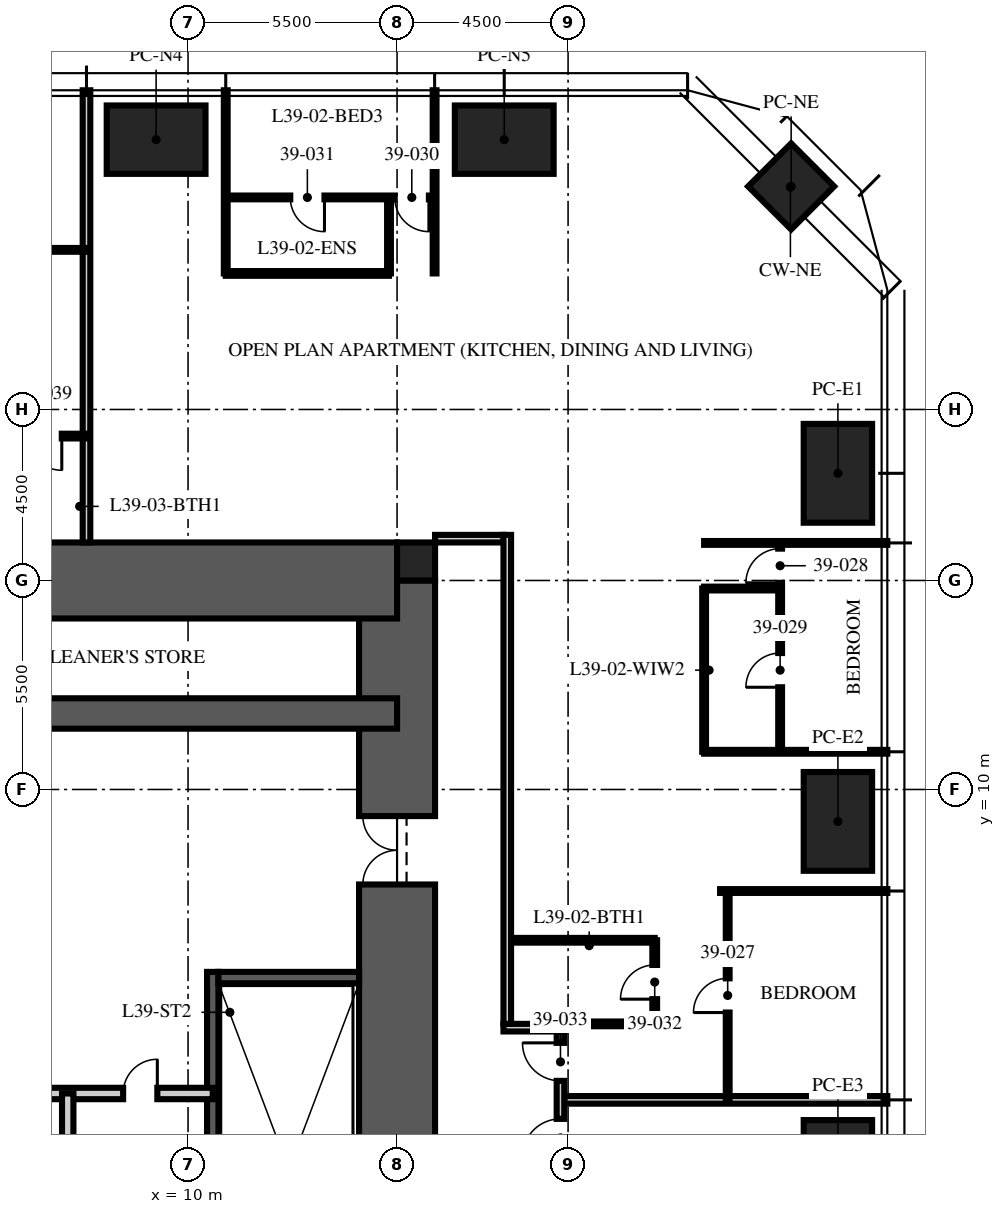
"""IFC4 building model, lengths in metres.
Left out: names, types, materials, properties, quantities, classifications, styles, units other than length and angle.
Written with IfcOpenShell. Run it as: python <this file> out.ifc"""

import sys

from ifc_helpers import new_model, si_unit, direction, frame, frame_2d, origin, origin_2d, place, context, subcontext, project, spatial, rectangle, extrude, element, fill, save


model = new_model("IFC4")
c1 = context("Model", 3, precision=1e-05, world=origin(), true_north=direction((0.0, 1.0)))
c2 = subcontext(c1, "Body", "Model", "MODEL_VIEW")
j1 = project(units=[si_unit("LENGTHUNIT", "METRE"), si_unit("PLANEANGLEUNIT", "RADIAN")], contexts=[c1])
p1 = place(None, origin())
s1 = spatial("IfcSite", under=j1, at=p1, CompositionType="ELEMENT")
p2 = place(p1, origin())
s2 = spatial("IfcBuilding", under=s1, at=p2, CompositionType="ELEMENT")
p3 = place(p2, frame((0.0, 0.0, 156.0)))
s3 = spatial("IfcBuildingStorey", under=s2, at=p3, CompositionType="ELEMENT", Elevation=156.0)
p4 = place(p3, frame((15.5, -15.5, -0.25), z_axis=(0.0, 0.0, 1.0), x_axis=(0.0, 1.0, 0.0)))
e1 = element("IfcWall", 1, at=p4, inside=s3, PredefinedType="SHEAR", context=c2, shape_type="SweptSolid", body=[
    extrude(rectangle(XDim=31.0, YDim=2.0, at=frame_2d((15.5, 0.0))), origin(), (0.0, 0.0, 1.0), 3.75),
])
p5 = place(p4, frame((6.5, 0.0, 0.25)))
e2 = element("IfcOpeningElement", 2, at=p5, cuts=e1, PredefinedType="OPENING", context=c2, shape_type="SweptSolid", body=[
    extrude(rectangle(XDim=1.2, YDim=2.1, at=frame_2d((0.6, 1.05))), frame((0.0, 1.01, 0.0), z_axis=(0.0, -1.0, 0.0), x_axis=(1.0, 0.0, 0.0)), (0.0, 0.0, 1.0), 2.02),
])
p6 = place(p4, frame((23.0, 0.0, 0.25)))
e3 = element("IfcOpeningElement", 3, at=p6, cuts=e1, PredefinedType="OPENING", context=c2, shape_type="SweptSolid", body=[
    extrude(rectangle(XDim=1.8, YDim=2.1, at=frame_2d((0.9, 1.05))), frame((0.0, 1.01, 0.0), z_axis=(0.0, -1.0, 0.0), x_axis=(1.0, 0.0, 0.0)), (0.0, 0.0, 1.0), 2.02),
])
p7 = place(p3, frame((-15.5, 15.5, -0.25), z_axis=(0.0, 0.0, 1.0), x_axis=(1.0, 0.0, 0.0)))
e4 = element("IfcWall", 4, at=p7, inside=s3, PredefinedType="SHEAR", context=c2, shape_type="SweptSolid", body=[
    extrude(rectangle(XDim=31.0, YDim=2.0, at=frame_2d((15.5, 0.0))), origin(), (0.0, 0.0, 1.0), 3.75),
])
p8 = place(p7, frame((5.0, 0.0, 0.25)))
e5 = element("IfcOpeningElement", 5, at=p8, cuts=e4, PredefinedType="OPENING", context=c2, shape_type="SweptSolid", body=[
    extrude(rectangle(XDim=1.0, YDim=2.1, at=frame_2d((0.5, 1.05))), frame((0.0, 1.01, 0.0), z_axis=(0.0, -1.0, 0.0), x_axis=(1.0, 0.0, 0.0)), (0.0, 0.0, 1.0), 2.02),
])
p9 = place(p3, frame((-15.5, 12.0, -0.25), z_axis=(0.0, 0.0, 1.0), x_axis=(1.0, 0.0, 0.0)))
e6 = element("IfcWall", 6, at=p9, inside=s3, PredefinedType="SHEAR", context=c2, shape_type="SweptSolid", body=[
    extrude(rectangle(XDim=31.0, YDim=0.8, at=frame_2d((15.5, 0.0))), origin(), (0.0, 0.0, 1.0), 3.75),
])
p10 = place(p3, frame((16.0, 16.0, -0.25), z_axis=(0.0, 0.0, 1.0), x_axis=(1.0, 0.0, 0.0)))
e7 = element("IfcColumn", 7, at=p10, inside=s3, PredefinedType="COLUMN", context=c2, shape_type="SweptSolid", body=[
    extrude(rectangle(XDim=1.0, YDim=1.0, at=origin_2d()), origin(), (0.0, 0.0, 1.0), 3.75),
])
for number, where, z_axis, x_axis in (
    (8, (9.16, 27.1, 0.0), (0.0, 0.0, 1.0), (1.0, 0.0, 0.0)),
    (9, (18.32, 27.1, 0.0), (0.0, 0.0, 1.0), (1.0, 0.0, 0.0)),
    (10, (27.1, 18.32, 0.0), (0.0, 0.0, 1.0), (0.0, 1.0, 0.0)),
    (11, (27.1, 9.16, 0.0), (0.0, 0.0, 1.0), (0.0, 1.0, 0.0)),
    (12, (27.1, 0.0, 0.0), (0.0, 0.0, 1.0), (0.0, 1.0, 0.0)),
):
    element("IfcColumn", number, at=place(p3, frame(where, z_axis=z_axis, x_axis=x_axis)), inside=s3, PredefinedType="COLUMN", context=c2, shape_type="SweptSolid", body=[
        extrude(rectangle(XDim=2.6, YDim=1.8, at=origin_2d()), origin(), (0.0, 0.0, 1.0), 3.75),
    ])
p11 = place(p3, frame((25.87, 25.87, 0.0), z_axis=(0.0, 0.0, 1.0), x_axis=(0.707106781187, -0.707106781187, 0.0)))
e13 = element("IfcColumn", 13, at=p11, inside=s3, PredefinedType="COLUMN", context=c2, shape_type="SweptSolid", body=[
    extrude(rectangle(XDim=1.6, YDim=1.6, at=origin_2d()), origin(), (0.0, 0.0, 1.0), 3.75),
])
p12 = place(p3, frame((10.65, -4.9, 0.0), z_axis=(0.0, 0.0, 1.0), x_axis=(0.0, 1.0, 0.0)))
e14 = element("IfcWall", 14, at=p12, inside=s3, PredefinedType="SOLIDWALL", context=c2, shape_type="SweptSolid", body=[
    extrude(rectangle(XDim=10.1, YDim=0.3, at=frame_2d((5.05, 0.0))), origin(), (0.0, 0.0, 1.0), 3.5),
])
p13 = place(p3, frame((14.5, 5.05, 0.0), z_axis=(0.0, 0.0, 1.0), x_axis=(-1.0, 0.0, 0.0)))
e15 = element("IfcWall", 15, at=p13, inside=s3, PredefinedType="SOLIDWALL", context=c2, shape_type="SweptSolid", body=[
    extrude(rectangle(XDim=3.7, YDim=0.3, at=frame_2d((1.85, 0.0))), origin(), (0.0, 0.0, 1.0), 3.5),
])
p14 = place(p3, frame((-10.65, 2.0, 0.0), z_axis=(0.0, 0.0, 1.0), x_axis=(1.0, 0.0, 0.0)))
e16 = element("IfcWall", 16, at=p14, inside=s3, PredefinedType="PARTITIONING", context=c2, shape_type="SweptSolid", body=[
    extrude(rectangle(XDim=21.3, YDim=0.3, at=frame_2d((10.65, 0.0))), origin(), (0.0, 0.0, 1.0), 3.5),
])
p15 = place(p14, frame((10.05, 0.0, 0.0)))
e17 = element("IfcOpeningElement", 17, at=p15, cuts=e16, PredefinedType="OPENING", context=c2, shape_type="SweptSolid", body=[
    extrude(rectangle(XDim=1.2, YDim=2.1, at=frame_2d((0.6, 1.05))), frame((0.0, 0.16, 0.0), z_axis=(0.0, -1.0, 0.0), x_axis=(1.0, 0.0, 0.0)), (0.0, 0.0, 1.0), 0.32),
])
p16 = place(p14, frame((18.942, 0.0, 0.0)))
e18 = element("IfcOpeningElement", 18, at=p16, cuts=e16, PredefinedType="OPENING", context=c2, shape_type="SweptSolid", body=[
    extrude(rectangle(XDim=0.9, YDim=2.1, at=frame_2d((0.45, 1.05))), frame((0.0, 0.16, 0.0), z_axis=(0.0, -1.0, 0.0), x_axis=(1.0, 0.0, 0.0)), (0.0, 0.0, 1.0), 0.32),
])
p17 = place(p3, frame((6.834, -6.65, 0.0), z_axis=(0.0, 0.0, 1.0), x_axis=(0.0, 1.0, 0.0)))
e19 = element("IfcWall", 19, at=p17, inside=s3, PredefinedType="PARTITIONING", context=c2, shape_type="SweptSolid", body=[
    extrude(rectangle(XDim=8.65, YDim=0.3, at=frame_2d((4.325, 0.0))), origin(), (0.0, 0.0, 1.0), 3.5),
])
p18 = place(p3, frame((16.5, 16.6, 0.0), z_axis=(0.0, 0.0, 1.0), x_axis=(1.0, 0.0, 0.0)))
e20 = element("IfcWall", 20, at=p18, inside=s3, PredefinedType="PARTITIONING", context=c2, shape_type="SweptSolid", body=[
    extrude(rectangle(XDim=1.8, YDim=0.2, at=frame_2d((0.9, 0.0))), origin(), (0.0, 0.0, 1.0), 2.3),
])
p19 = place(p3, frame((19.9, 1.832, 0.0), z_axis=(0.0, 0.0, 1.0), x_axis=(1.0, 0.0, 0.0)))
e21 = element("IfcWall", 21, at=p19, inside=s3, PredefinedType="PARTITIONING", context=c2, shape_type="SweptSolid", body=[
    extrude(rectangle(XDim=8.5, YDim=0.2, at=frame_2d((4.25, 0.0))), origin(), (0.0, 0.0, 1.0), 2.81),
])
p20 = place(p3, frame((24.0, 7.328, 0.0), z_axis=(0.0, 0.0, 1.0), x_axis=(1.0, 0.0, 0.0)))
e22 = element("IfcWall", 22, at=p20, inside=s3, PredefinedType="PARTITIONING", context=c2, shape_type="SweptSolid", body=[
    extrude(rectangle(XDim=4.4, YDim=0.1, at=frame_2d((2.2, 0.0))), origin(), (0.0, 0.0, 1.0), 2.81),
])
for number, where, z_axis, x_axis in (
    (23, (23.58, 10.992, 0.0), (0.0, 0.0, 1.0), (1.0, 0.0, 0.0)),
    (24, (23.58, 16.488, 0.0), (0.0, 0.0, 1.0), (1.0, 0.0, 0.0)),
    (25, (16.488, 23.58, 0.0), (0.0, 0.0, 1.0), (0.0, 1.0, 0.0)),
    (26, (10.992, 23.58, 0.0), (0.0, 0.0, 1.0), (0.0, 1.0, 0.0)),
):
    element("IfcWall", number, at=place(p3, frame(where, z_axis=z_axis, x_axis=x_axis)), inside=s3, PredefinedType="PARTITIONING", context=c2, shape_type="SweptSolid", body=[
        extrude(rectangle(XDim=4.82, YDim=0.1, at=frame_2d((2.41, 0.0))), origin(), (0.0, 0.0, 1.0), 2.81),
    ])
p21 = place(p3, frame((7.328, 16.5, 0.0), z_axis=(0.0, 0.0, 1.0), x_axis=(0.0, 1.0, 0.0)))
e27 = element("IfcWall", 27, at=p21, inside=s3, PredefinedType="PARTITIONING", context=c2, shape_type="SweptSolid", body=[
    extrude(rectangle(XDim=11.9, YDim=0.2, at=frame_2d((5.95, 0.0))), origin(), (0.0, 0.0, 1.0), 2.81),
])
p22 = place(p3, frame((24.2, 1.832, 0.0), z_axis=(0.0, 0.0, 1.0), x_axis=(0.0, 1.0, 0.0)))
e28 = element("IfcWall", 28, at=p22, inside=s3, PredefinedType="PARTITIONING", context=c2, shape_type="SweptSolid", body=[
    extrude(rectangle(XDim=5.496, YDim=0.1, at=frame_2d((2.748, 0.0))), origin(), (0.0, 0.0, 1.0), 2.81),
])
p23 = place(p22, frame((2.298, 0.0, 0.0)))
e29 = element("IfcOpeningElement", 29, at=p23, cuts=e28, PredefinedType="OPENING", context=c2, shape_type="SweptSolid", body=[
    extrude(rectangle(XDim=0.9, YDim=2.1, at=frame_2d((0.45, 1.05))), frame((0.0, 0.06, 0.0), z_axis=(0.0, -1.0, 0.0), x_axis=(1.0, 0.0, 0.0)), (0.0, 0.0, 1.0), 0.12),
])
p24 = place(p3, frame((25.58, 10.992, 0.0), z_axis=(0.0, 0.0, 1.0), x_axis=(0.0, 1.0, 0.0)))
e30 = element("IfcWall", 30, at=p24, inside=s3, PredefinedType="PARTITIONING", context=c2, shape_type="SweptSolid", body=[
    extrude(rectangle(XDim=5.496, YDim=0.1, at=frame_2d((2.748, 0.0))), origin(), (0.0, 0.0, 1.0), 2.81),
])
p25 = place(p24, frame((4.446, 0.0, 0.0)))
e31 = element("IfcOpeningElement", 31, at=p25, cuts=e30, PredefinedType="OPENING", context=c2, shape_type="SweptSolid", body=[
    extrude(rectangle(XDim=0.9, YDim=2.1, at=frame_2d((0.45, 1.05))), frame((0.0, 0.06, 0.0), z_axis=(0.0, -1.0, 0.0), x_axis=(1.0, 0.0, 0.0)), (0.0, 0.0, 1.0), 0.12),
])
p26 = place(p24, frame((1.698, 0.0, 0.0)))
e32 = element("IfcOpeningElement", 32, at=p26, cuts=e30, PredefinedType="OPENING", context=c2, shape_type="SweptSolid", body=[
    extrude(rectangle(XDim=0.9, YDim=2.1, at=frame_2d((0.45, 1.05))), frame((0.0, 0.06, 0.0), z_axis=(0.0, -1.0, 0.0), x_axis=(1.0, 0.0, 0.0)), (0.0, 0.0, 1.0), 0.12),
])
p27 = place(p3, frame((23.58, 15.288, 0.0), z_axis=(0.0, 0.0, 1.0), x_axis=(1.0, 0.0, 0.0)))
e33 = element("IfcWall", 33, at=p27, inside=s3, PredefinedType="PARTITIONING", context=c2, shape_type="SweptSolid", body=[
    extrude(rectangle(XDim=2.0, YDim=0.1, at=frame_2d((1.0, 0.0))), origin(), (0.0, 0.0, 1.0), 3.5),
])
p28 = place(p3, frame((23.58, 10.992, 0.0), z_axis=(0.0, 0.0, 1.0), x_axis=(0.0, 1.0, 0.0)))
e34 = element("IfcWall", 34, at=p28, inside=s3, PredefinedType="PARTITIONING", context=c2, shape_type="SweptSolid", body=[
    extrude(rectangle(XDim=4.296, YDim=0.1, at=frame_2d((2.148, 0.0))), origin(), (0.0, 0.0, 1.0), 2.81),
])
p29 = place(p3, frame((16.488, 25.58, 0.0), z_axis=(0.0, 0.0, 1.0), x_axis=(-1.0, 0.0, 0.0)))
e35 = element("IfcWall", 35, at=p29, inside=s3, PredefinedType="PARTITIONING", context=c2, shape_type="SweptSolid", body=[
    extrude(rectangle(XDim=5.496, YDim=0.1, at=frame_2d((2.748, 0.0))), origin(), (0.0, 0.0, 1.0), 2.81),
])
p30 = place(p29, frame((0.15, 0.0, 0.0)))
e36 = element("IfcOpeningElement", 36, at=p30, cuts=e35, PredefinedType="OPENING", context=c2, shape_type="SweptSolid", body=[
    extrude(rectangle(XDim=0.9, YDim=2.1, at=frame_2d((0.45, 1.05))), frame((0.0, 0.06, 0.0), z_axis=(0.0, -1.0, 0.0), x_axis=(1.0, 0.0, 0.0)), (0.0, 0.0, 1.0), 0.12),
])
p31 = place(p29, frame((2.898, 0.0, 0.0)))
e37 = element("IfcOpeningElement", 37, at=p31, cuts=e35, PredefinedType="OPENING", context=c2, shape_type="SweptSolid", body=[
    extrude(rectangle(XDim=0.9, YDim=2.1, at=frame_2d((0.45, 1.05))), frame((0.0, 0.06, 0.0), z_axis=(0.0, -1.0, 0.0), x_axis=(1.0, 0.0, 0.0)), (0.0, 0.0, 1.0), 0.12),
])
p32 = place(p3, frame((15.288, 23.58, 0.0), z_axis=(0.0, 0.0, 1.0), x_axis=(0.0, 1.0, 0.0)))
e38 = element("IfcWall", 38, at=p32, inside=s3, PredefinedType="PARTITIONING", context=c2, shape_type="SweptSolid", body=[
    extrude(rectangle(XDim=2.0, YDim=0.1, at=frame_2d((1.0, 0.0))), origin(), (0.0, 0.0, 1.0), 3.5),
])
p33 = place(p3, frame((15.288, 23.58, 0.0), z_axis=(0.0, 0.0, 1.0), x_axis=(-1.0, 0.0, 0.0)))
e39 = element("IfcWall", 39, at=p33, inside=s3, PredefinedType="PARTITIONING", context=c2, shape_type="SweptSolid", body=[
    extrude(rectangle(XDim=4.296, YDim=0.125, at=frame_2d((2.148, 0.0))), origin(), (0.0, 0.0, 1.0), 2.81),
])
p34 = place(p3, frame((22.28, 3.832, 0.0), z_axis=(0.0, 0.0, 1.0), x_axis=(0.0, 1.0, 0.0)))
e40 = element("IfcWall", 40, at=p34, inside=s3, PredefinedType="PARTITIONING", context=c2, shape_type="SweptSolid", body=[
    extrude(rectangle(XDim=2.2, YDim=0.125, at=frame_2d((1.1, 0.0))), origin(), (0.0, 0.0, 1.0), 2.81),
])
p35 = place(p34, frame((0.65, 0.0, 0.0)))
e41 = element("IfcOpeningElement", 41, at=p35, cuts=e40, PredefinedType="OPENING", context=c2, shape_type="SweptSolid", body=[
    extrude(rectangle(XDim=0.9, YDim=2.1, at=frame_2d((0.45, 1.05))), frame((0.0, 0.073, 0.0), z_axis=(0.0, -1.0, 0.0), x_axis=(1.0, 0.0, 0.0)), (0.0, 0.0, 1.0), 0.145),
])
p36 = place(p3, frame((19.97, 3.832, 0.0), z_axis=(0.0, 0.0, 1.0), x_axis=(1.0, 0.0, 0.0)))
e42 = element("IfcWall", 42, at=p36, inside=s3, PredefinedType="PARTITIONING", context=c2, shape_type="SweptSolid", body=[
    extrude(rectangle(XDim=2.31, YDim=0.125, at=frame_2d((1.155, 0.0))), origin(), (0.0, 0.0, 1.0), 3.5),
])
p37 = place(p3, frame((18.5, 6.032, 0.0), z_axis=(0.0, 0.0, 1.0), x_axis=(1.0, 0.0, 0.0)))
e43 = element("IfcWall", 43, at=p37, inside=s3, PredefinedType="PARTITIONING", context=c2, shape_type="SweptSolid", body=[
    extrude(rectangle(XDim=3.78, YDim=0.125, at=frame_2d((1.89, 0.0))), origin(), (0.0, 0.0, 1.0), 3.5),
])
p38 = place(p3, frame((7.328, 24.2, 0.0), z_axis=(0.0, 0.0, 1.0), x_axis=(-1.0, 0.0, 0.0)))
e44 = element("IfcWall", 44, at=p38, inside=s3, PredefinedType="PARTITIONING", context=c2, shape_type="SweptSolid", body=[
    extrude(rectangle(XDim=5.496, YDim=0.1, at=frame_2d((2.748, 0.0))), origin(), (0.0, 0.0, 1.0), 2.81),
])
p39 = place(p38, frame((2.298, 0.0, 0.0)))
e45 = element("IfcOpeningElement", 45, at=p39, cuts=e44, PredefinedType="OPENING", context=c2, shape_type="SweptSolid", body=[
    extrude(rectangle(XDim=0.9, YDim=2.1, at=frame_2d((0.45, 1.05))), frame((0.0, 0.06, 0.0), z_axis=(0.0, -1.0, 0.0), x_axis=(1.0, 0.0, 0.0)), (0.0, 0.0, 1.0), 0.12),
])
p40 = place(p3, frame((7.328, 19.3, 0.0), z_axis=(0.0, 0.0, 1.0), x_axis=(-1.0, 0.0, 0.0)))
e46 = element("IfcWall", 46, at=p40, inside=s3, PredefinedType="PARTITIONING", context=c2, shape_type="SweptSolid", body=[
    extrude(rectangle(XDim=6.2, YDim=0.125, at=frame_2d((3.1, 0.0))), origin(), (0.0, 0.0, 1.0), 2.81),
])
p41 = place(p40, frame((0.65, 0.0, 0.0)))
e47 = element("IfcOpeningElement", 47, at=p41, cuts=e46, PredefinedType="OPENING", context=c2, shape_type="SweptSolid", body=[
    extrude(rectangle(XDim=0.9, YDim=2.1, at=frame_2d((0.45, 1.05))), frame((0.0, 0.073, 0.0), z_axis=(0.0, -1.0, 0.0), x_axis=(1.0, 0.0, 0.0)), (0.0, 0.0, 1.0), 0.145),
])
p42 = place(p40, frame((2.85, 0.0, 0.0)))
e48 = element("IfcOpeningElement", 48, at=p42, cuts=e46, PredefinedType="OPENING", context=c2, shape_type="SweptSolid", body=[
    extrude(rectangle(XDim=0.9, YDim=2.1, at=frame_2d((0.45, 1.05))), frame((0.0, 0.073, 0.0), z_axis=(0.0, -1.0, 0.0), x_axis=(1.0, 0.0, 0.0)), (0.0, 0.0, 1.0), 0.145),
])
p43 = place(p40, frame((4.85, 0.0, 0.0)))
e49 = element("IfcOpeningElement", 49, at=p43, cuts=e46, PredefinedType="OPENING", context=c2, shape_type="SweptSolid", body=[
    extrude(rectangle(XDim=0.9, YDim=2.1, at=frame_2d((0.45, 1.05))), frame((0.0, 0.073, 0.0), z_axis=(0.0, -1.0, 0.0), x_axis=(1.0, 0.0, 0.0)), (0.0, 0.0, 1.0), 0.145),
])
p44 = place(p3, frame((18.3, 3.732, 0.0), z_axis=(0.0, 0.0, 1.0), x_axis=(1.0, 0.0, 0.0)))
e50 = element("IfcWall", 50, at=p44, inside=s3, PredefinedType="PARTITIONING", context=c2, shape_type="SweptSolid", body=[
    extrude(rectangle(XDim=1.6, YDim=0.2, at=frame_2d((0.8, 0.0))), origin(), (0.0, 0.0, 1.0), 3.5),
])
p45 = place(p3, frame((19.8, 0.032, 0.0), z_axis=(0.0, 0.0, 1.0), x_axis=(0.0, 1.0, 0.0)))
e51 = element("IfcWall", 51, at=p45, inside=s3, PredefinedType="PARTITIONING", context=c2, shape_type="SweptSolid", body=[
    extrude(rectangle(XDim=3.6, YDim=0.2, at=frame_2d((1.8, 0.0))), origin(), (0.0, 0.0, 1.0), 2.7),
])
p46 = place(p45, frame((0.3, 0.0, 0.0)))
e52 = element("IfcOpeningElement", 52, at=p46, cuts=e51, PredefinedType="OPENING", context=c2, shape_type="SweptSolid", body=[
    extrude(rectangle(XDim=1.0, YDim=2.2, at=frame_2d((0.5, 1.1))), frame((0.0, 0.11, 0.0), z_axis=(0.0, -1.0, 0.0), x_axis=(1.0, 0.0, 0.0)), (0.0, 0.0, 1.0), 0.22),
])
p47 = place(p45, frame((2.3, 0.0, 0.0)))
e53 = element("IfcOpeningElement", 53, at=p47, cuts=e51, PredefinedType="OPENING", context=c2, shape_type="SweptSolid", body=[
    extrude(rectangle(XDim=1.0, YDim=2.2, at=frame_2d((0.5, 1.1))), frame((0.0, 0.11, 0.0), z_axis=(0.0, -1.0, 0.0), x_axis=(1.0, 0.0, 0.0)), (0.0, 0.0, 1.0), 0.22),
])
p48 = place(p3, frame((18.4, 3.832, 0.0), z_axis=(0.0, 0.0, 1.0), x_axis=(0.0, 1.0, 0.0)))
e54 = element("IfcWall", 54, at=p48, inside=s3, PredefinedType="PARTITIONING", context=c2, shape_type="SweptSolid", body=[
    extrude(rectangle(XDim=12.868, YDim=0.2, at=frame_2d((6.434, 0.0))), origin(), (0.0, 0.0, 1.0), 2.7),
])
p49 = place(p6, origin())
e55 = element("IfcDoor", 55, at=p49, inside=s3, OperationType="DOUBLE_DOOR_SINGLE_SWING", PredefinedType="DOOR", context=c2, shape_type="SweptSolid", body=[
    extrude(rectangle(XDim=1.8, YDim=2.1, at=frame_2d((0.9, 1.05))), frame((0.0, 0.025, 0.0), z_axis=(0.0, -1.0, 0.0), x_axis=(1.0, 0.0, 0.0)), (0.0, 0.0, 1.0), 0.05),
])
fill(e3, e55)
p50 = place(p16, origin())
e56 = element("IfcDoor", 56, at=p50, inside=s3, OperationType="SINGLE_SWING_RIGHT", PredefinedType="DOOR", context=c2, shape_type="SweptSolid", body=[
    extrude(rectangle(XDim=0.9, YDim=2.1, at=frame_2d((0.45, 1.05))), frame((0.0, 0.025, 0.0), z_axis=(0.0, -1.0, 0.0), x_axis=(1.0, 0.0, 0.0)), (0.0, 0.0, 1.0), 0.05),
])
fill(e18, e56)
p51 = place(p46, origin())
e57 = element("IfcDoor", 57, at=p51, inside=s3, OperationType="SINGLE_SWING_LEFT", PredefinedType="DOOR", context=c2, shape_type="SweptSolid", body=[
    extrude(rectangle(XDim=1.0, YDim=2.2, at=frame_2d((0.5, 1.1))), frame((0.0, 0.025, 0.0), z_axis=(0.0, -1.0, 0.0), x_axis=(1.0, 0.0, 0.0)), (0.0, 0.0, 1.0), 0.05),
])
fill(e52, e57)
p52 = place(p23, origin())
e58 = element("IfcDoor", 58, at=p52, inside=s3, OperationType="SINGLE_SWING_LEFT", PredefinedType="DOOR", context=c2, shape_type="SweptSolid", body=[
    extrude(rectangle(XDim=0.9, YDim=2.1, at=frame_2d((0.45, 1.05))), frame((0.0, 0.025, 0.0), z_axis=(0.0, -1.0, 0.0), x_axis=(1.0, 0.0, 0.0)), (0.0, 0.0, 1.0), 0.05),
])
fill(e29, e58)
p53 = place(p25, origin())
e59 = element("IfcDoor", 59, at=p53, inside=s3, OperationType="SINGLE_SWING_LEFT", PredefinedType="DOOR", context=c2, shape_type="SweptSolid", body=[
    extrude(rectangle(XDim=0.9, YDim=2.1, at=frame_2d((0.45, 1.05))), frame((0.0, 0.025, 0.0), z_axis=(0.0, -1.0, 0.0), x_axis=(1.0, 0.0, 0.0)), (0.0, 0.0, 1.0), 0.05),
])
fill(e31, e59)
p54 = place(p26, origin())
e60 = element("IfcDoor", 60, at=p54, inside=s3, OperationType="SINGLE_SWING_LEFT", PredefinedType="DOOR", context=c2, shape_type="SweptSolid", body=[
    extrude(rectangle(XDim=0.9, YDim=2.1, at=frame_2d((0.45, 1.05))), frame((0.0, 0.025, 0.0), z_axis=(0.0, -1.0, 0.0), x_axis=(1.0, 0.0, 0.0)), (0.0, 0.0, 1.0), 0.05),
])
fill(e32, e60)
p55 = place(p30, origin())
e61 = element("IfcDoor", 61, at=p55, inside=s3, OperationType="SINGLE_SWING_LEFT", PredefinedType="DOOR", context=c2, shape_type="SweptSolid", body=[
    extrude(rectangle(XDim=0.9, YDim=2.1, at=frame_2d((0.45, 1.05))), frame((0.0, 0.025, 0.0), z_axis=(0.0, -1.0, 0.0), x_axis=(1.0, 0.0, 0.0)), (0.0, 0.0, 1.0), 0.05),
])
fill(e36, e61)
p56 = place(p31, origin())
e62 = element("IfcDoor", 62, at=p56, inside=s3, OperationType="SINGLE_SWING_LEFT", PredefinedType="DOOR", context=c2, shape_type="SweptSolid", body=[
    extrude(rectangle(XDim=0.9, YDim=2.1, at=frame_2d((0.45, 1.05))), frame((0.0, 0.025, 0.0), z_axis=(0.0, -1.0, 0.0), x_axis=(1.0, 0.0, 0.0)), (0.0, 0.0, 1.0), 0.05),
])
fill(e37, e62)
p57 = place(p35, origin())
e63 = element("IfcDoor", 63, at=p57, inside=s3, OperationType="SINGLE_SWING_LEFT", PredefinedType="DOOR", context=c2, shape_type="SweptSolid", body=[
    extrude(rectangle(XDim=0.9, YDim=2.1, at=frame_2d((0.45, 1.05))), frame((0.0, 0.025, 0.0), z_axis=(0.0, -1.0, 0.0), x_axis=(1.0, 0.0, 0.0)), (0.0, 0.0, 1.0), 0.05),
])
fill(e41, e63)
p58 = place(p47, origin())
e64 = element("IfcDoor", 64, at=p58, inside=s3, OperationType="SINGLE_SWING_RIGHT", PredefinedType="DOOR", context=c2, shape_type="SweptSolid", body=[
    extrude(rectangle(XDim=1.0, YDim=2.2, at=frame_2d((0.5, 1.1))), frame((0.0, 0.025, 0.0), z_axis=(0.0, -1.0, 0.0), x_axis=(1.0, 0.0, 0.0)), (0.0, 0.0, 1.0), 0.05),
])
fill(e53, e64)
p59 = place(p41, origin())
e65 = element("IfcDoor", 65, at=p59, inside=s3, OperationType="SINGLE_SWING_LEFT", PredefinedType="DOOR", context=c2, shape_type="SweptSolid", body=[
    extrude(rectangle(XDim=0.9, YDim=2.1, at=frame_2d((0.45, 1.05))), frame((0.0, 0.025, 0.0), z_axis=(0.0, -1.0, 0.0), x_axis=(1.0, 0.0, 0.0)), (0.0, 0.0, 1.0), 0.05),
])
fill(e47, e65)
save(model, sys.argv[1])
